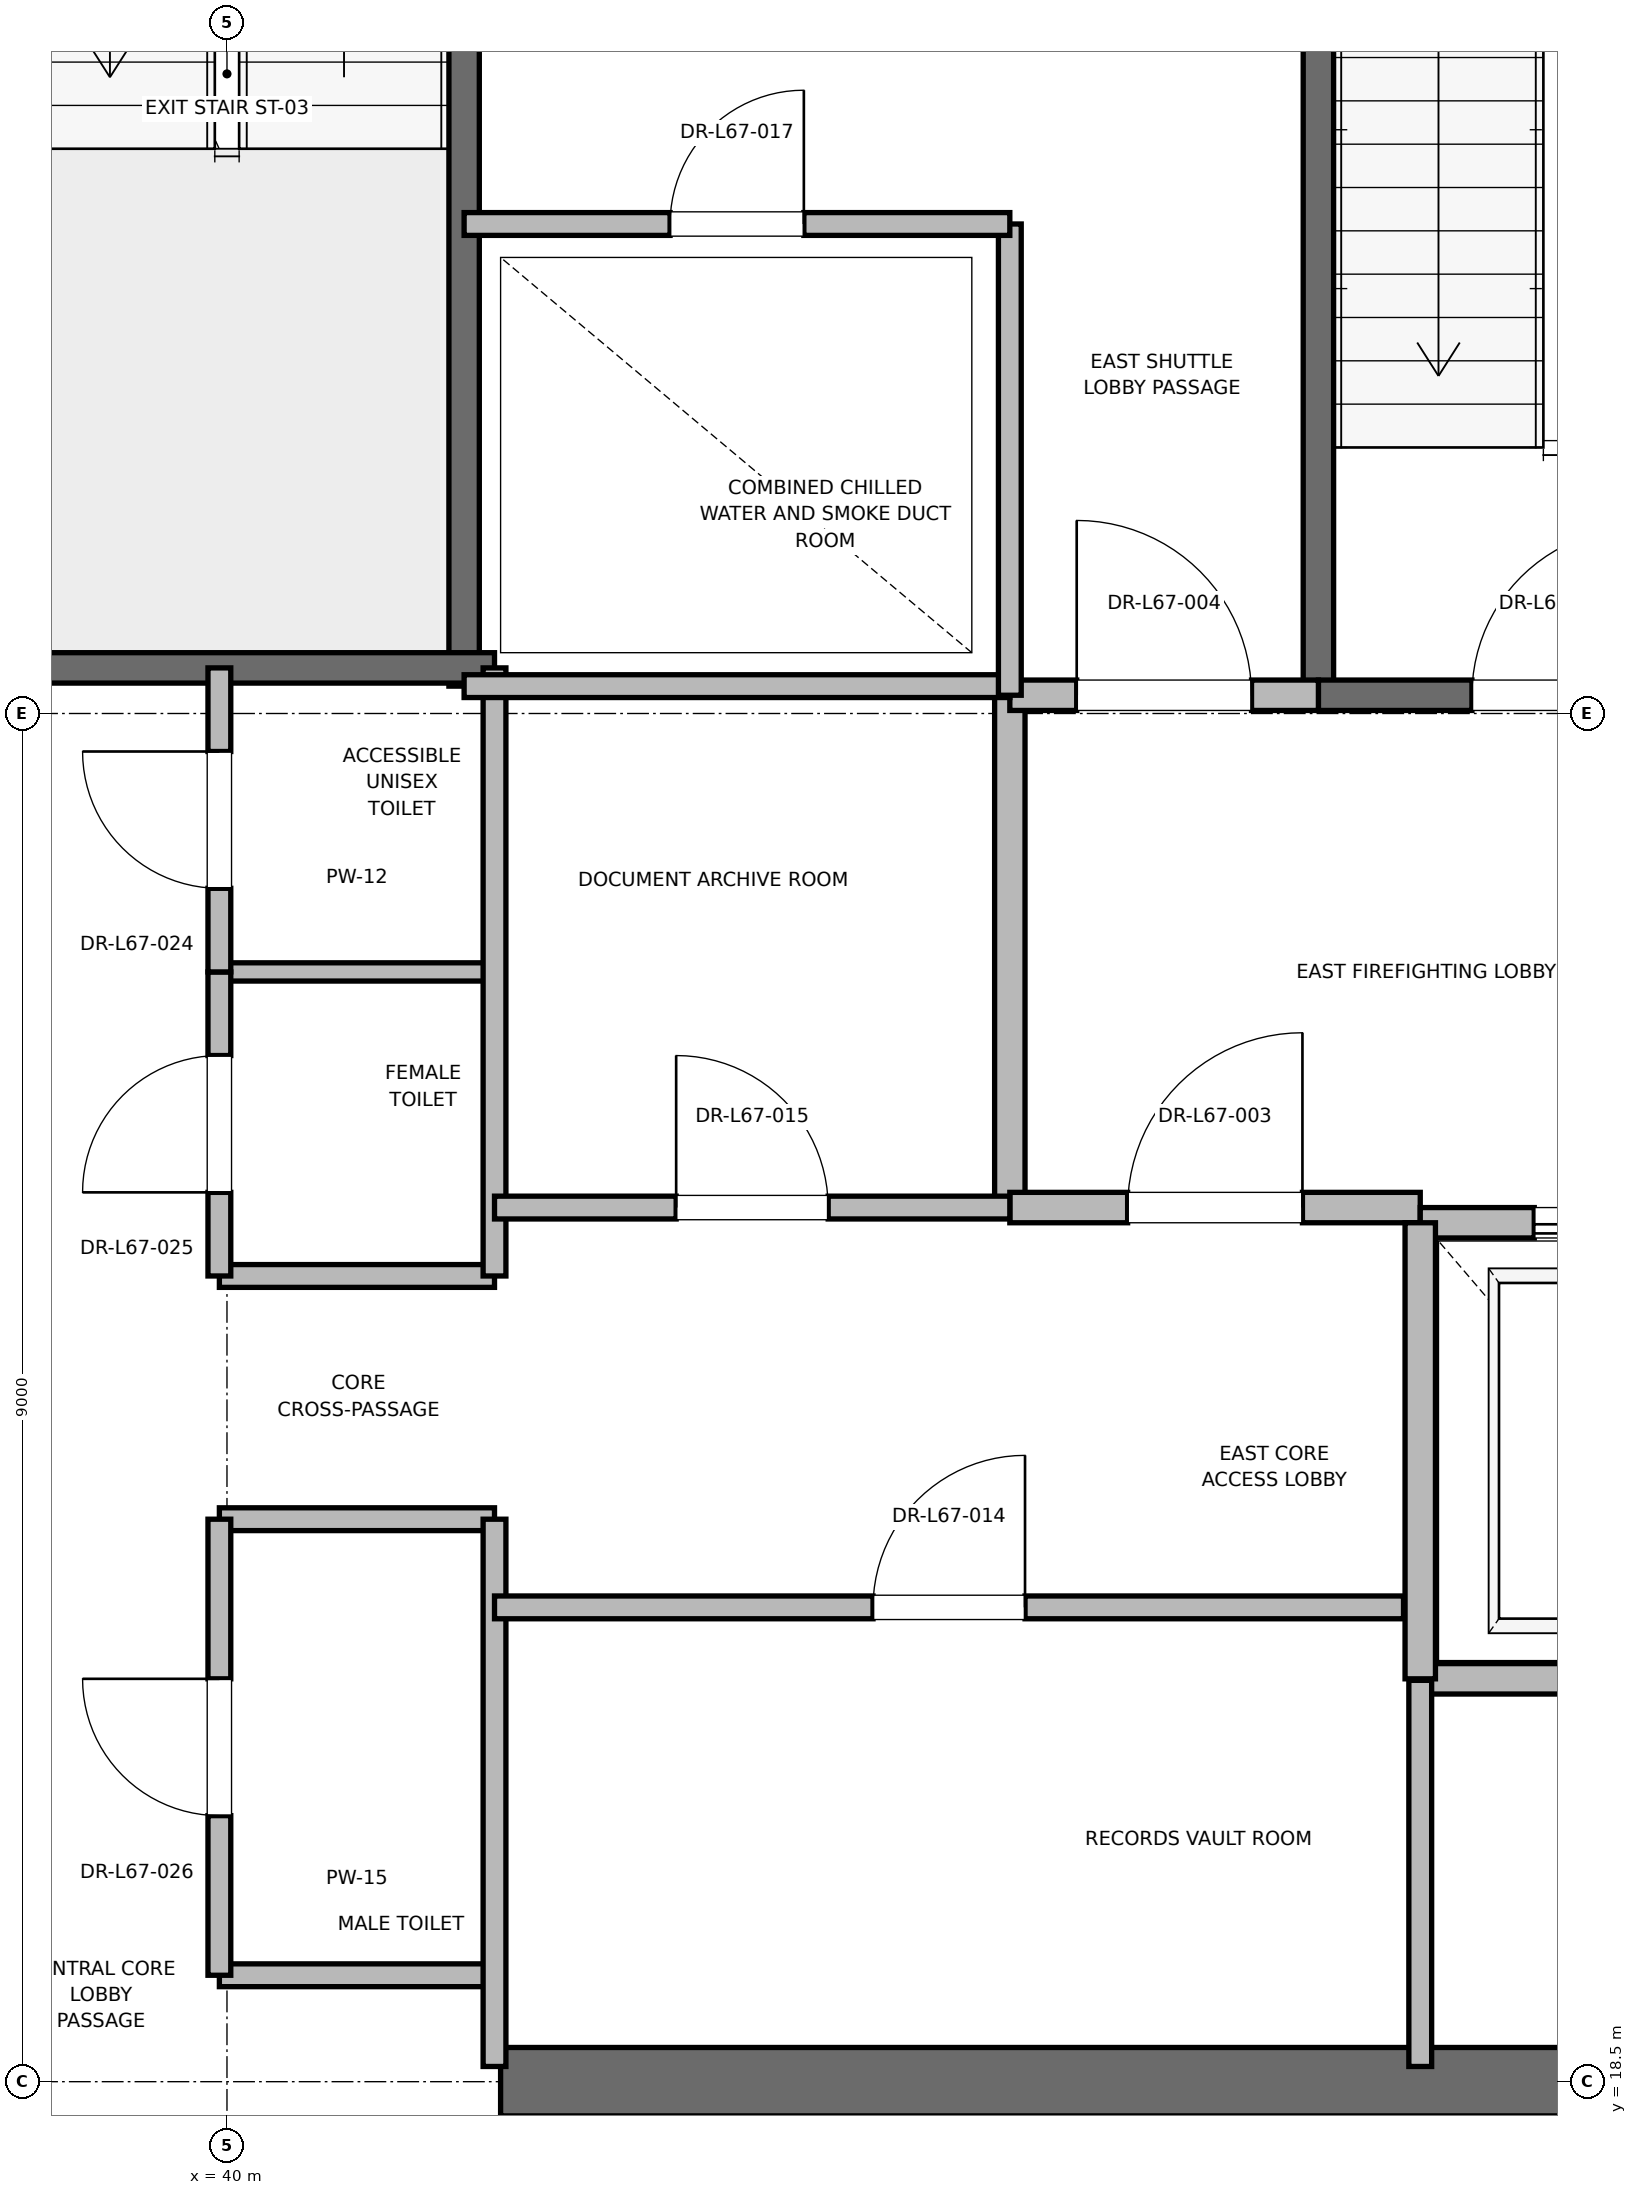
"""IFC4 building model, lengths in metres.
Left out: names, types, materials, properties, quantities, classifications, styles, units other than length and angle.
Written with IfcOpenShell. Run it as: python <this file> out.ifc"""

import sys

from ifc_helpers import new_model, si_unit, direction, frame, frame_2d, origin, place, context, subcontext, project, spatial, rectangle, extrude, element, fill, save


model = new_model("IFC4")
c1 = context("Model", 3, precision=1e-05, world=origin(), true_north=direction((0.0, 1.0)))
c2 = subcontext(c1, "Body", "Model", "MODEL_VIEW")
j1 = project(units=[si_unit("LENGTHUNIT", "METRE"), si_unit("PLANEANGLEUNIT", "RADIAN")], contexts=[c1])
p1 = place(None, origin())
s1 = spatial("IfcSite", under=j1, at=p1, CompositionType="ELEMENT")
p2 = place(p1, origin())
s2 = spatial("IfcBuilding", under=s1, at=p2, CompositionType="ELEMENT")
p3 = place(p2, frame((0.0, 0.0, 287.2)))
s3 = spatial("IfcBuildingStorey", under=s2, at=p3, CompositionType="ELEMENT", Elevation=287.2)
p4 = place(p3, frame((41.8, 18.5, 0.0), z_axis=(0.0, 0.0, 1.0), x_axis=(1.0, 0.0, 0.0)))
e1 = element("IfcWall", 1, at=p4, inside=s3, PredefinedType="SHEAR", context=c2, shape_type="SweptSolid", body=[
    extrude(rectangle(XDim=9.2, YDim=0.45, at=frame_2d((4.6, 0.0))), origin(), (0.0, 0.0, 1.0), 3.785),
])
p5 = place(p3, frame((47.18, 27.62, 0.0), z_axis=(0.0, 0.0, 1.0), x_axis=(0.0, 1.0, 0.0)))
e2 = element("IfcWall", 2, at=p5, inside=s3, PredefinedType="SOLIDWALL", context=c2, shape_type="SweptSolid", body=[
    extrude(rectangle(XDim=8.18, YDim=0.2, at=frame_2d((4.09, 0.0))), origin(), (0.0, 0.0, 1.0), 3.785),
])
p6 = place(p3, frame((47.18, 27.62, 0.0), z_axis=(0.0, 0.0, 1.0), x_axis=(1.0, 0.0, 0.0)))
e3 = element("IfcWall", 3, at=p6, inside=s3, PredefinedType="SOLIDWALL", context=c2, shape_type="SweptSolid", body=[
    extrude(rectangle(XDim=3.12, YDim=0.2, at=frame_2d((1.56, 0.0))), origin(), (0.0, 0.0, 1.0), 3.785),
])
p7 = place(p6, frame((1.01, 0.0, 0.0)))
e4 = element("IfcOpeningElement", 4, at=p7, cuts=e3, PredefinedType="OPENING", context=c2, shape_type="SweptSolid", body=[
    extrude(rectangle(XDim=1.1, YDim=2.15, at=frame_2d((0.55, 1.075))), frame((0.0, 0.1, 0.0), z_axis=(0.0, -1.0, 0.0), x_axis=(1.0, 0.0, 0.0)), (0.0, 0.0, 1.0), 0.2),
])
p8 = place(p3, frame((41.56, 27.68, 0.0), z_axis=(0.0, 0.0, 1.0), x_axis=(0.0, 1.0, 0.0)))
e5 = element("IfcWall", 5, at=p8, inside=s3, PredefinedType="SOLIDWALL", context=c2, shape_type="SweptSolid", body=[
    extrude(rectangle(XDim=8.57, YDim=0.2, at=frame_2d((4.285, 0.0))), origin(), (0.0, 0.0, 1.0), 3.785),
])
p9 = place(p3, frame((38.44, 27.8, 0.0), z_axis=(0.0, 0.0, 1.0), x_axis=(1.0, 0.0, 0.0)))
e6 = element("IfcWall", 6, at=p9, inside=s3, PredefinedType="SOLIDWALL", context=c2, shape_type="SweptSolid", body=[
    extrude(rectangle(XDim=3.32, YDim=0.2, at=frame_2d((1.66, 0.0))), origin(), (0.0, 0.0, 1.0), 3.785),
])
p10 = place(p3, frame((45.15, 24.25, 0.0), z_axis=(0.0, 0.0, 1.0), x_axis=(0.0, 1.0, 0.0)))
e7 = element("IfcWall", 7, at=p10, inside=s3, PredefinedType="PARTITIONING", context=c2, shape_type="SweptSolid", body=[
    extrude(rectangle(XDim=3.37, YDim=0.2, at=frame_2d((1.685, 0.0))), origin(), (0.0, 0.0, 1.0), 3.785),
])
p11 = place(p3, frame((45.15, 24.25, 0.0), z_axis=(0.0, 0.0, 1.0), x_axis=(1.0, 0.0, 0.0)))
e8 = element("IfcWall", 8, at=p11, inside=s3, PredefinedType="PARTITIONING", context=c2, shape_type="SweptSolid", body=[
    extrude(rectangle(XDim=2.7, YDim=0.2, at=frame_2d((1.35, 0.0))), origin(), (0.0, 0.0, 1.0), 3.785),
])
p12 = place(p11, frame((0.775, 0.0, 0.0)))
e9 = element("IfcOpeningElement", 9, at=p12, cuts=e8, PredefinedType="OPENING", context=c2, shape_type="SweptSolid", body=[
    extrude(rectangle(XDim=1.15, YDim=2.2, at=frame_2d((0.575, 1.1))), frame((0.0, 0.1, 0.0), z_axis=(0.0, -1.0, 0.0), x_axis=(1.0, 0.0, 0.0)), (0.0, 0.0, 1.0), 0.2),
])
p13 = place(p3, frame((45.15, 27.62, 0.0), z_axis=(0.0, 0.0, 1.0), x_axis=(1.0, 0.0, 0.0)))
e10 = element("IfcWall", 10, at=p13, inside=s3, PredefinedType="PARTITIONING", context=c2, shape_type="SweptSolid", body=[
    extrude(rectangle(XDim=2.03, YDim=0.2, at=frame_2d((1.015, 0.0))), origin(), (0.0, 0.0, 1.0), 3.785),
])
p14 = place(p13, frame((0.44, 0.0, 0.0)))
e11 = element("IfcOpeningElement", 11, at=p14, cuts=e10, PredefinedType="OPENING", context=c2, shape_type="SweptSolid", body=[
    extrude(rectangle(XDim=1.15, YDim=2.2, at=frame_2d((0.575, 1.1))), frame((0.0, 0.1, 0.0), z_axis=(0.0, -1.0, 0.0), x_axis=(1.0, 0.0, 0.0)), (0.0, 0.0, 1.0), 0.2),
])
p15 = place(p3, frame((47.85, 21.15, 0.0), z_axis=(0.0, 0.0, 1.0), x_axis=(1.0, 0.0, 0.0)))
e12 = element("IfcWall", 12, at=p15, inside=s3, PredefinedType="SOLIDWALL", context=c2, shape_type="SweptSolid", body=[
    extrude(rectangle(XDim=2.6, YDim=0.2, at=frame_2d((1.3, 0.0))), origin(), (0.0, 0.0, 1.0), 3.785),
])
p16 = place(p3, frame((50.45, 24.15, 0.0), z_axis=(0.0, 0.0, 1.0), x_axis=(-1.0, 0.0, 0.0)))
e13 = element("IfcWall", 13, at=p16, inside=s3, PredefinedType="SOLIDWALL", context=c2, shape_type="SweptSolid", body=[
    extrude(rectangle(XDim=2.6, YDim=0.2, at=frame_2d((1.3, 0.0))), origin(), (0.0, 0.0, 1.0), 2.865),
])
p17 = place(p16, frame((0.75, 0.0, 0.0)))
e14 = element("IfcOpeningElement", 14, at=p17, cuts=e13, PredefinedType="OPENING", context=c2, shape_type="SweptSolid", body=[
    extrude(rectangle(XDim=1.1, YDim=2.2, at=frame_2d((0.55, 1.1))), frame((0.0, 0.1, 0.0), z_axis=(0.0, -1.0, 0.0), x_axis=(1.0, 0.0, 0.0)), (0.0, 0.0, 1.0), 0.2),
])
p18 = place(p3, frame((47.85, 24.15, 0.0), z_axis=(0.0, 0.0, 1.0), x_axis=(0.0, -1.0, 0.0)))
e15 = element("IfcWall", 15, at=p18, inside=s3, PredefinedType="SOLIDWALL", context=c2, shape_type="SweptSolid", body=[
    extrude(rectangle(XDim=3.0, YDim=0.2, at=frame_2d((1.5, 0.0))), origin(), (0.0, 0.0, 1.0), 3.785),
])
for number, where, z_axis, x_axis in (
    (16, (39.95, 19.2, 0.0), (0.0, 0.0, 1.0), (1.0, 0.0, 0.0)),
    (17, (39.95, 22.2, 0.0), (0.0, 0.0, 1.0), (1.0, 0.0, 0.0)),
    (18, (39.95, 23.8, 0.0), (0.0, 0.0, 1.0), (1.0, 0.0, 0.0)),
):
    element("IfcWall", number, at=place(p3, frame(where, z_axis=z_axis, x_axis=x_axis)), inside=s3, PredefinedType="PARTITIONING", context=c2, shape_type="SweptSolid", body=[
        extrude(rectangle(XDim=1.81, YDim=0.15, at=frame_2d((0.905, 0.0))), origin(), (0.0, 0.0, 1.0), 2.85),
    ])
p19 = place(p3, frame((39.95, 25.8, 0.0), z_axis=(0.0, 0.0, 1.0), x_axis=(1.0, 0.0, 0.0)))
e19 = element("IfcWall", 19, at=p19, inside=s3, PredefinedType="PARTITIONING", context=c2, shape_type="SweptSolid", body=[
    extrude(rectangle(XDim=1.81, YDim=0.12, at=frame_2d((0.905, 0.0))), origin(), (0.0, 0.0, 1.0), 2.85),
])
p20 = place(p3, frame((41.76, 18.6, 0.0), z_axis=(0.0, 0.0, 1.0), x_axis=(0.0, 1.0, 0.0)))
e20 = element("IfcWall", 20, at=p20, inside=s3, PredefinedType="PARTITIONING", context=c2, shape_type="SweptSolid", body=[
    extrude(rectangle(XDim=3.6, YDim=0.15, at=frame_2d((1.8, 0.0))), origin(), (0.0, 0.0, 1.0), 2.85),
])
p21 = place(p3, frame((41.76, 23.8, 0.0), z_axis=(0.0, 0.0, 1.0), x_axis=(0.0, 1.0, 0.0)))
e21 = element("IfcWall", 21, at=p21, inside=s3, PredefinedType="PARTITIONING", context=c2, shape_type="SweptSolid", body=[
    extrude(rectangle(XDim=4.0, YDim=0.15, at=frame_2d((2.0, 0.0))), origin(), (0.0, 0.0, 1.0), 2.85),
])
p22 = place(p3, frame((39.95, 19.2, 0.0), z_axis=(0.0, 0.0, 1.0), x_axis=(0.0, 1.0, 0.0)))
e22 = element("IfcWall", 22, at=p22, inside=s3, PredefinedType="PARTITIONING", context=c2, shape_type="SweptSolid", body=[
    extrude(rectangle(XDim=3.0, YDim=0.15, at=frame_2d((1.5, 0.0))), origin(), (0.0, 0.0, 1.0), 2.85),
])
p23 = place(p22, frame((1.05, 0.0, 0.0)))
e23 = element("IfcOpeningElement", 23, at=p23, cuts=e22, PredefinedType="OPENING", context=c2, shape_type="SweptSolid", body=[
    extrude(rectangle(XDim=0.9, YDim=2.1, at=frame_2d((0.45, 1.05))), frame((0.0, 0.075, 0.0), z_axis=(0.0, -1.0, 0.0), x_axis=(1.0, 0.0, 0.0)), (0.0, 0.0, 1.0), 0.15),
])
p24 = place(p3, frame((39.95, 23.8, 0.0), z_axis=(0.0, 0.0, 1.0), x_axis=(0.0, 1.0, 0.0)))
e24 = element("IfcWall", 24, at=p24, inside=s3, PredefinedType="PARTITIONING", context=c2, shape_type="SweptSolid", body=[
    extrude(rectangle(XDim=2.0, YDim=0.15, at=frame_2d((1.0, 0.0))), origin(), (0.0, 0.0, 1.0), 2.85),
])
p25 = place(p24, frame((0.55, 0.0, 0.0)))
e25 = element("IfcOpeningElement", 25, at=p25, cuts=e24, PredefinedType="OPENING", context=c2, shape_type="SweptSolid", body=[
    extrude(rectangle(XDim=0.9, YDim=2.1, at=frame_2d((0.45, 1.05))), frame((0.0, 0.075, 0.0), z_axis=(0.0, -1.0, 0.0), x_axis=(1.0, 0.0, 0.0)), (0.0, 0.0, 1.0), 0.15),
])
p26 = place(p3, frame((39.95, 25.8, 0.0), z_axis=(0.0, 0.0, 1.0), x_axis=(0.0, 1.0, 0.0)))
e26 = element("IfcWall", 26, at=p26, inside=s3, PredefinedType="PARTITIONING", context=c2, shape_type="SweptSolid", body=[
    extrude(rectangle(XDim=2.0, YDim=0.15, at=frame_2d((1.0, 0.0))), origin(), (0.0, 0.0, 1.0), 2.85),
])
p27 = place(p26, frame((0.55, 0.0, 0.0)))
e27 = element("IfcOpeningElement", 27, at=p27, cuts=e26, PredefinedType="OPENING", context=c2, shape_type="SweptSolid", body=[
    extrude(rectangle(XDim=0.9, YDim=2.1, at=frame_2d((0.45, 1.05))), frame((0.0, 0.075, 0.0), z_axis=(0.0, -1.0, 0.0), x_axis=(1.0, 0.0, 0.0)), (0.0, 0.0, 1.0), 0.15),
])
p28 = place(p3, frame((41.56, 27.68, 0.0), z_axis=(0.0, 0.0, 1.0), x_axis=(1.0, 0.0, 0.0)))
e28 = element("IfcWall", 28, at=p28, inside=s3, PredefinedType="PARTITIONING", context=c2, shape_type="SweptSolid", body=[
    extrude(rectangle(XDim=3.59, YDim=0.15, at=frame_2d((1.795, 0.0))), origin(), (0.0, 0.0, 1.0), 2.85),
])
p29 = place(p3, frame((47.85, 18.6, 0.0), z_axis=(0.0, 0.0, 1.0), x_axis=(0.0, 1.0, 0.0)))
e29 = element("IfcWall", 29, at=p29, inside=s3, PredefinedType="PARTITIONING", context=c2, shape_type="SweptSolid", body=[
    extrude(rectangle(XDim=2.54, YDim=0.15, at=frame_2d((1.27, 0.0))), origin(), (0.0, 0.0, 1.0), 2.85),
])
p30 = place(p3, frame((41.76, 21.62, 0.0), z_axis=(0.0, 0.0, 1.0), x_axis=(1.0, 0.0, 0.0)))
e30 = element("IfcWall", 30, at=p30, inside=s3, PredefinedType="PARTITIONING", context=c2, shape_type="SweptSolid", body=[
    extrude(rectangle(XDim=5.98, YDim=0.15, at=frame_2d((2.99, 0.0))), origin(), (0.0, 0.0, 1.0), 2.85),
])
p31 = place(p30, frame((2.49, 0.0, 0.0)))
e31 = element("IfcOpeningElement", 31, at=p31, cuts=e30, PredefinedType="OPENING", context=c2, shape_type="SweptSolid", body=[
    extrude(rectangle(XDim=1.0, YDim=2.15, at=frame_2d((0.5, 1.075))), frame((0.0, 0.075, 0.0), z_axis=(0.0, -1.0, 0.0), x_axis=(1.0, 0.0, 0.0)), (0.0, 0.0, 1.0), 0.15),
])
p32 = place(p3, frame((41.76, 24.25, 0.0), z_axis=(0.0, 0.0, 1.0), x_axis=(1.0, 0.0, 0.0)))
e32 = element("IfcWall", 32, at=p32, inside=s3, PredefinedType="PARTITIONING", context=c2, shape_type="SweptSolid", body=[
    extrude(rectangle(XDim=3.39, YDim=0.15, at=frame_2d((1.695, 0.0))), origin(), (0.0, 0.0, 1.0), 2.85),
])
p33 = place(p32, frame((1.195, 0.0, 0.0)))
e33 = element("IfcOpeningElement", 33, at=p33, cuts=e32, PredefinedType="OPENING", context=c2, shape_type="SweptSolid", body=[
    extrude(rectangle(XDim=1.0, YDim=2.15, at=frame_2d((0.5, 1.075))), frame((0.0, 0.075, 0.0), z_axis=(0.0, -1.0, 0.0), x_axis=(1.0, 0.0, 0.0)), (0.0, 0.0, 1.0), 0.15),
])
p34 = place(p3, frame((45.15, 27.62, 0.0), z_axis=(0.0, 0.0, 1.0), x_axis=(0.0, 1.0, 0.0)))
e34 = element("IfcWall", 34, at=p34, inside=s3, PredefinedType="PARTITIONING", context=c2, shape_type="SweptSolid", body=[
    extrude(rectangle(XDim=3.1, YDim=0.15, at=frame_2d((1.55, 0.0))), origin(), (0.0, 0.0, 1.0), 2.85),
])
p35 = place(p3, frame((41.56, 30.72, 0.0), z_axis=(0.0, 0.0, 1.0), x_axis=(1.0, 0.0, 0.0)))
e35 = element("IfcWall", 35, at=p35, inside=s3, PredefinedType="PARTITIONING", context=c2, shape_type="SweptSolid", body=[
    extrude(rectangle(XDim=3.59, YDim=0.15, at=frame_2d((1.795, 0.0))), origin(), (0.0, 0.0, 1.0), 2.85),
])
p36 = place(p35, frame((1.355, 0.0, 0.0)))
e36 = element("IfcOpeningElement", 36, at=p36, cuts=e35, PredefinedType="OPENING", context=c2, shape_type="SweptSolid", body=[
    extrude(rectangle(XDim=0.88, YDim=2.1, at=frame_2d((0.44, 1.05))), frame((0.0, 0.075, 0.0), z_axis=(0.0, -1.0, 0.0), x_axis=(1.0, 0.0, 0.0)), (0.0, 0.0, 1.0), 0.15),
])
p37 = place(p7, origin())
e37 = element("IfcDoor", 37, at=p37, inside=s3, OperationType="SINGLE_SWING_RIGHT", PredefinedType="DOOR", context=c2, shape_type="SweptSolid", body=[
    extrude(rectangle(XDim=1.1, YDim=2.15, at=frame_2d((0.55, 1.075))), frame((0.0, 0.025, 0.0), z_axis=(0.0, -1.0, 0.0), x_axis=(1.0, 0.0, 0.0)), (0.0, 0.0, 1.0), 0.05),
])
fill(e4, e37)
p38 = place(p12, origin())
e38 = element("IfcDoor", 38, at=p38, inside=s3, OperationType="SINGLE_SWING_RIGHT", PredefinedType="DOOR", context=c2, shape_type="SweptSolid", body=[
    extrude(rectangle(XDim=1.15, YDim=2.2, at=frame_2d((0.575, 1.1))), frame((0.0, 0.025, 0.0), z_axis=(0.0, -1.0, 0.0), x_axis=(1.0, 0.0, 0.0)), (0.0, 0.0, 1.0), 0.05),
])
fill(e9, e38)
p39 = place(p14, origin())
e39 = element("IfcDoor", 39, at=p39, inside=s3, OperationType="SINGLE_SWING_LEFT", PredefinedType="DOOR", context=c2, shape_type="SweptSolid", body=[
    extrude(rectangle(XDim=1.15, YDim=2.2, at=frame_2d((0.575, 1.1))), frame((0.0, 0.025, 0.0), z_axis=(0.0, -1.0, 0.0), x_axis=(1.0, 0.0, 0.0)), (0.0, 0.0, 1.0), 0.05),
])
fill(e11, e39)
p40 = place(p17, origin())
e40 = element("IfcDoor", 40, at=p40, inside=s3, OperationType="SLIDING_TO_RIGHT", PredefinedType="DOOR", context=c2, shape_type="SweptSolid", body=[
    extrude(rectangle(XDim=1.1, YDim=2.2, at=frame_2d((0.55, 1.1))), frame((0.0, 0.025, 0.0), z_axis=(0.0, -1.0, 0.0), x_axis=(1.0, 0.0, 0.0)), (0.0, 0.0, 1.0), 0.05),
])
fill(e14, e40)
p41 = place(p23, origin())
e41 = element("IfcDoor", 41, at=p41, inside=s3, OperationType="SINGLE_SWING_RIGHT", PredefinedType="DOOR", context=c2, shape_type="SweptSolid", body=[
    extrude(rectangle(XDim=0.9, YDim=2.1, at=frame_2d((0.45, 1.05))), frame((0.0, 0.025, 0.0), z_axis=(0.0, -1.0, 0.0), x_axis=(1.0, 0.0, 0.0)), (0.0, 0.0, 1.0), 0.05),
])
fill(e23, e41)
p42 = place(p25, origin())
e42 = element("IfcDoor", 42, at=p42, inside=s3, OperationType="SINGLE_SWING_LEFT", PredefinedType="DOOR", context=c2, shape_type="SweptSolid", body=[
    extrude(rectangle(XDim=0.9, YDim=2.1, at=frame_2d((0.45, 1.05))), frame((0.0, 0.025, 0.0), z_axis=(0.0, -1.0, 0.0), x_axis=(1.0, 0.0, 0.0)), (0.0, 0.0, 1.0), 0.05),
])
fill(e25, e42)
p43 = place(p27, origin())
e43 = element("IfcDoor", 43, at=p43, inside=s3, OperationType="SINGLE_SWING_RIGHT", PredefinedType="DOOR", context=c2, shape_type="SweptSolid", body=[
    extrude(rectangle(XDim=0.9, YDim=2.1, at=frame_2d((0.45, 1.05))), frame((0.0, 0.025, 0.0), z_axis=(0.0, -1.0, 0.0), x_axis=(1.0, 0.0, 0.0)), (0.0, 0.0, 1.0), 0.05),
])
fill(e27, e43)
p44 = place(p31, origin())
e44 = element("IfcDoor", 44, at=p44, inside=s3, OperationType="SINGLE_SWING_RIGHT", PredefinedType="DOOR", context=c2, shape_type="SweptSolid", body=[
    extrude(rectangle(XDim=1.0, YDim=2.15, at=frame_2d((0.5, 1.075))), frame((0.0, 0.025, 0.0), z_axis=(0.0, -1.0, 0.0), x_axis=(1.0, 0.0, 0.0)), (0.0, 0.0, 1.0), 0.05),
])
fill(e31, e44)
p45 = place(p33, origin())
e45 = element("IfcDoor", 45, at=p45, inside=s3, OperationType="SINGLE_SWING_LEFT", PredefinedType="DOOR", context=c2, shape_type="SweptSolid", body=[
    extrude(rectangle(XDim=1.0, YDim=2.15, at=frame_2d((0.5, 1.075))), frame((0.0, 0.025, 0.0), z_axis=(0.0, -1.0, 0.0), x_axis=(1.0, 0.0, 0.0)), (0.0, 0.0, 1.0), 0.05),
])
fill(e33, e45)
p46 = place(p36, origin())
e46 = element("IfcDoor", 46, at=p46, inside=s3, OperationType="SINGLE_SWING_RIGHT", PredefinedType="DOOR", context=c2, shape_type="SweptSolid", body=[
    extrude(rectangle(XDim=0.88, YDim=2.1, at=frame_2d((0.44, 1.05))), frame((0.0, 0.025, 0.0), z_axis=(0.0, -1.0, 0.0), x_axis=(1.0, 0.0, 0.0)), (0.0, 0.0, 1.0), 0.05),
])
fill(e36, e46)
save(model, sys.argv[1])
